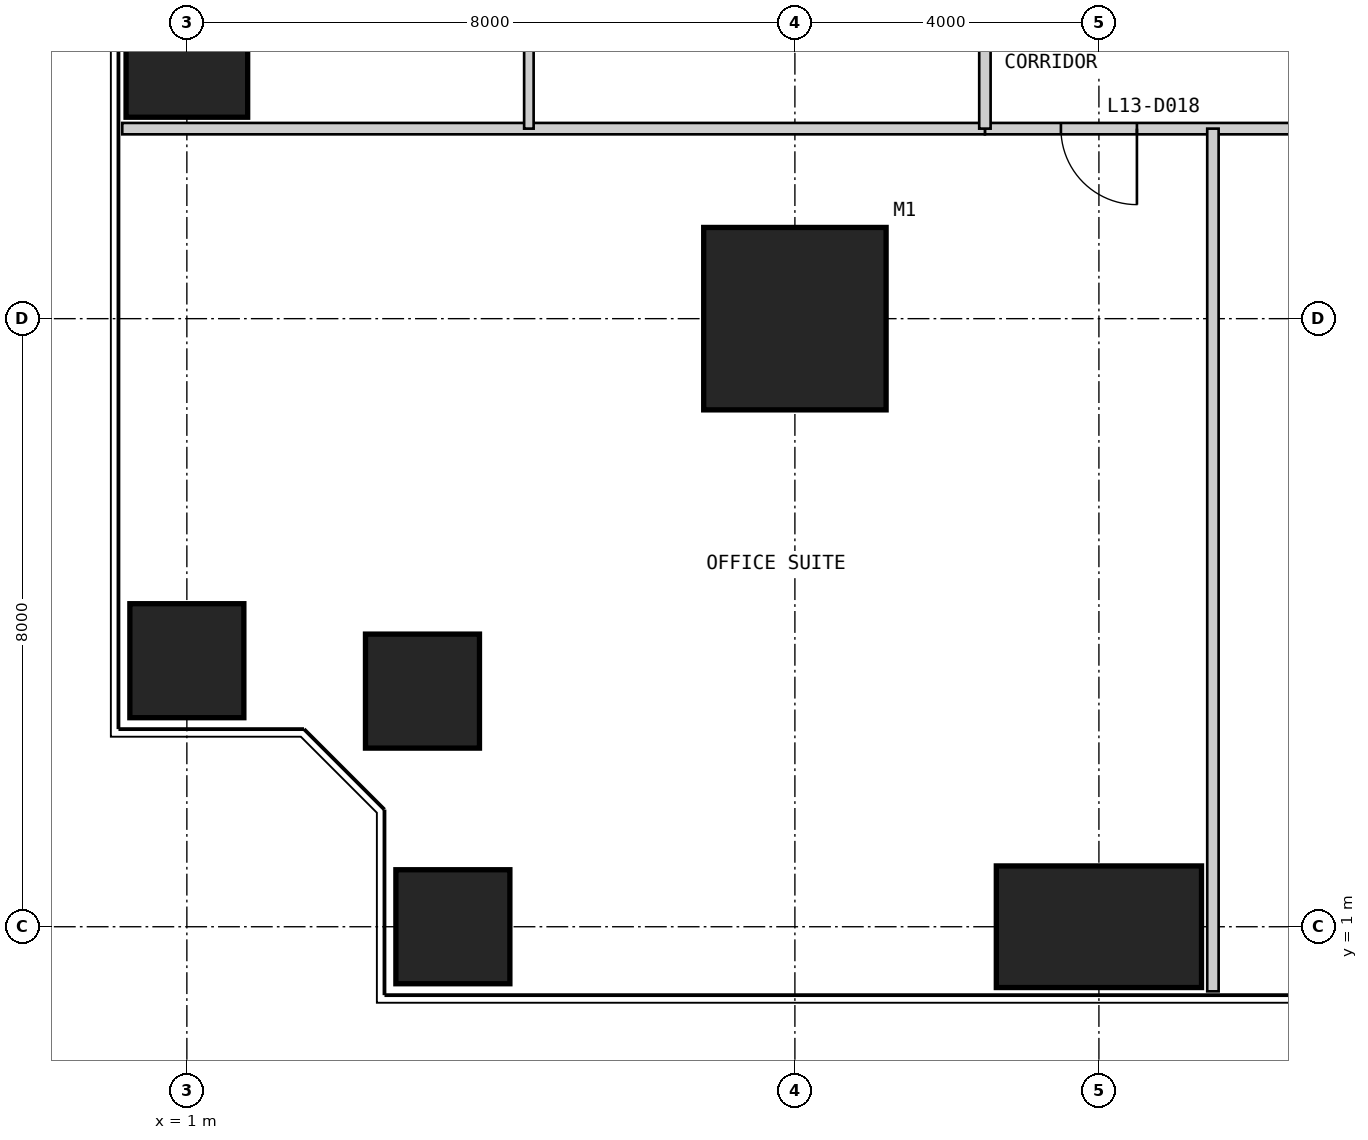
"""IFC4 building model, lengths in metres.
Left out: names, types, materials, properties, quantities, classifications, styles, units other than length and angle.
Written with IfcOpenShell. Run it as: python <this file> out.ifc"""

import sys

from ifc_helpers import new_model, si_unit, direction, frame, frame_2d, origin, origin_2d, place, context, subcontext, project, spatial, rectangle, extrude, element, fill, save


model = new_model("IFC4")
c1 = context("Model", 3, precision=1e-05, world=origin(), true_north=direction((0.0, 1.0)))
c2 = subcontext(c1, "Body", "Model", "MODEL_VIEW")
j1 = project(units=[si_unit("LENGTHUNIT", "METRE"), si_unit("PLANEANGLEUNIT", "RADIAN")], contexts=[c1])
p1 = place(None, origin())
s1 = spatial("IfcSite", under=j1, at=p1, CompositionType="ELEMENT")
p2 = place(p1, origin())
s2 = spatial("IfcBuilding", under=s1, at=p2, CompositionType="ELEMENT")
p3 = place(p2, frame((0.0, 0.0, 59.0)))
s3 = spatial("IfcBuildingStorey", under=s2, at=p3, CompositionType="ELEMENT", Elevation=59.0)
p4 = place(p3, frame((9.0, 9.0, 0.0), z_axis=(0.0, 0.0, 1.0), x_axis=(1.0, 0.0, 0.0)))
e1 = element("IfcColumn", 1, at=p4, inside=s3, PredefinedType="COLUMN", context=c2, shape_type="SweptSolid", body=[
    extrude(rectangle(XDim=2.4, YDim=2.4, at=origin_2d()), origin(), (0.0, 0.0, 1.0), 4.0),
])
p5 = place(p3, frame((4.5, 1.0, 0.0), z_axis=(0.0, 0.0, 1.0), x_axis=(1.0, 0.0, 0.0)))
e2 = element("IfcColumn", 2, at=p5, inside=s3, PredefinedType="COLUMN", context=c2, shape_type="SweptSolid", body=[
    extrude(rectangle(XDim=1.5, YDim=1.5, at=origin_2d()), origin(), (0.0, 0.0, 1.0), 4.0),
])
p6 = place(p3, frame((13.0, 1.0, 0.0), z_axis=(0.0, 0.0, 1.0), x_axis=(1.0, 0.0, 0.0)))
e3 = element("IfcColumn", 3, at=p6, inside=s3, PredefinedType="COLUMN", context=c2, shape_type="SweptSolid", body=[
    extrude(rectangle(XDim=2.7, YDim=1.6, at=origin_2d()), origin(), (0.0, 0.0, 1.0), 4.0),
])
p7 = place(p3, frame((1.0, 13.0, 0.0), z_axis=(0.0, 0.0, 1.0), x_axis=(1.0, 0.0, 0.0)))
e4 = element("IfcColumn", 4, at=p7, inside=s3, PredefinedType="COLUMN", context=c2, shape_type="SweptSolid", body=[
    extrude(rectangle(XDim=1.6, YDim=2.7, at=origin_2d()), origin(), (0.0, 0.0, 1.0), 4.0),
])
for number, where, z_axis, x_axis in (
    (5, (1.0, 4.5, 0.0), (0.0, 0.0, 1.0), (1.0, 0.0, 0.0)),
    (6, (4.1, 4.1, 0.0), (0.0, 0.0, 1.0), (1.0, 0.0, 0.0)),
):
    element("IfcColumn", number, at=place(p3, frame(where, z_axis=z_axis, x_axis=x_axis)), inside=s3, PredefinedType="COLUMN", context=c2, shape_type="SweptSolid", body=[
        extrude(rectangle(XDim=1.5, YDim=1.5, at=origin_2d()), origin(), (0.0, 0.0, 1.0), 4.0),
    ])
p8 = place(p3, frame((11.5, 11.5, 0.0), z_axis=(0.0, 0.0, 1.0), x_axis=(1.0, 0.0, 0.0)))
e7 = element("IfcWall", 7, at=p8, inside=s3, PredefinedType="PARTITIONING", context=c2, shape_type="SweptSolid", body=[
    extrude(rectangle(XDim=27.0, YDim=0.15, at=frame_2d((13.5, 0.0))), origin(), (0.0, 0.0, 1.0), 3.85),
])
p9 = place(p8, frame((1.0, 0.0, 0.0)))
e8 = element("IfcOpeningElement", 8, at=p9, cuts=e7, PredefinedType="OPENING", context=c2, shape_type="SweptSolid", body=[
    extrude(rectangle(XDim=1.0, YDim=2.2, at=frame_2d((0.5, 1.1))), frame((0.0, 0.085, 0.0), z_axis=(0.0, -1.0, 0.0), x_axis=(1.0, 0.0, 0.0)), (0.0, 0.0, 1.0), 0.17),
])
p10 = place(p8, frame((5.5, 0.0, 0.0)))
e9 = element("IfcOpeningElement", 9, at=p10, cuts=e7, PredefinedType="OPENING", context=c2, shape_type="SweptSolid", body=[
    extrude(rectangle(XDim=1.0, YDim=2.2, at=frame_2d((0.5, 1.1))), frame((0.0, 0.085, 0.0), z_axis=(0.0, -1.0, 0.0), x_axis=(1.0, 0.0, 0.0)), (0.0, 0.0, 1.0), 0.17),
])
p11 = place(p8, frame((11.5, 0.0, 0.0)))
e10 = element("IfcOpeningElement", 10, at=p11, cuts=e7, PredefinedType="OPENING", context=c2, shape_type="SweptSolid", body=[
    extrude(rectangle(XDim=1.0, YDim=2.2, at=frame_2d((0.5, 1.1))), frame((0.0, 0.085, 0.0), z_axis=(0.0, -1.0, 0.0), x_axis=(1.0, 0.0, 0.0)), (0.0, 0.0, 1.0), 0.17),
])
p12 = place(p8, frame((19.0, 0.0, 0.0)))
e11 = element("IfcOpeningElement", 11, at=p12, cuts=e7, PredefinedType="OPENING", context=c2, shape_type="SweptSolid", body=[
    extrude(rectangle(XDim=1.0, YDim=2.2, at=frame_2d((0.5, 1.1))), frame((0.0, 0.085, 0.0), z_axis=(0.0, -1.0, 0.0), x_axis=(1.0, 0.0, 0.0)), (0.0, 0.0, 1.0), 0.17),
])
for number, where, z_axis, x_axis in (
    (12, (0.15, 11.5, 0.0), (0.0, 0.0, 1.0), (1.0, 0.0, 0.0)),
    (13, (14.5, 0.15, 0.0), (0.0, 0.0, 1.0), (0.0, 1.0, 0.0)),
):
    element("IfcWall", number, at=place(p3, frame(where, z_axis=z_axis, x_axis=x_axis)), inside=s3, PredefinedType="PARTITIONING", context=c2, shape_type="SweptSolid", body=[
        extrude(rectangle(XDim=11.35, YDim=0.15, at=frame_2d((5.675, 0.0))), origin(), (0.0, 0.0, 1.0), 3.85),
    ])
p13 = place(p3, frame((11.5, 38.5, 0.0), z_axis=(0.0, 0.0, 1.0), x_axis=(0.0, -1.0, 0.0)))
e14 = element("IfcWall", 14, at=p13, inside=s3, PredefinedType="PARTITIONING", context=c2, shape_type="SweptSolid", body=[
    extrude(rectangle(XDim=27.0, YDim=0.15, at=frame_2d((13.5, 0.0))), origin(), (0.0, 0.0, 1.0), 3.85),
])
p14 = place(p13, frame((1.0, 0.0, 0.0)))
e15 = element("IfcOpeningElement", 15, at=p14, cuts=e14, PredefinedType="OPENING", context=c2, shape_type="SweptSolid", body=[
    extrude(rectangle(XDim=1.0, YDim=2.2, at=frame_2d((0.5, 1.1))), frame((0.0, 0.085, 0.0), z_axis=(0.0, -1.0, 0.0), x_axis=(1.0, 0.0, 0.0)), (0.0, 0.0, 1.0), 0.17),
])
p15 = place(p13, frame((19.0, 0.0, 0.0)))
e16 = element("IfcOpeningElement", 16, at=p15, cuts=e14, PredefinedType="OPENING", context=c2, shape_type="SweptSolid", body=[
    extrude(rectangle(XDim=1.0, YDim=2.2, at=frame_2d((0.5, 1.1))), frame((0.0, 0.085, 0.0), z_axis=(0.0, -1.0, 0.0), x_axis=(1.0, 0.0, 0.0)), (0.0, 0.0, 1.0), 0.17),
])
p16 = place(p3, frame((5.5, 17.5, 0.0), z_axis=(0.0, 0.0, 1.0), x_axis=(0.0, -1.0, 0.0)))
e17 = element("IfcWall", 17, at=p16, inside=s3, PredefinedType="PARTITIONING", context=c2, shape_type="SweptSolid", body=[
    extrude(rectangle(XDim=6.0, YDim=0.125, at=frame_2d((3.0, 0.0))), origin(), (0.0, 0.0, 1.0), 3.85),
])
p17 = place(p9, frame((1.0, 0.0, 0.0), z_axis=(0.0, 0.0, 1.0), x_axis=(-1.0, 0.0, 0.0)))
e18 = element("IfcDoor", 18, at=p17, inside=s3, OperationType="SINGLE_SWING_LEFT", PredefinedType="DOOR", context=c2, shape_type="SweptSolid", body=[
    extrude(rectangle(XDim=1.0, YDim=2.2, at=frame_2d((0.5, 1.1))), frame((0.0, 0.025, 0.0), z_axis=(0.0, -1.0, 0.0), x_axis=(1.0, 0.0, 0.0)), (0.0, 0.0, 1.0), 0.05),
])
fill(e8, e18)
save(model, sys.argv[1])
